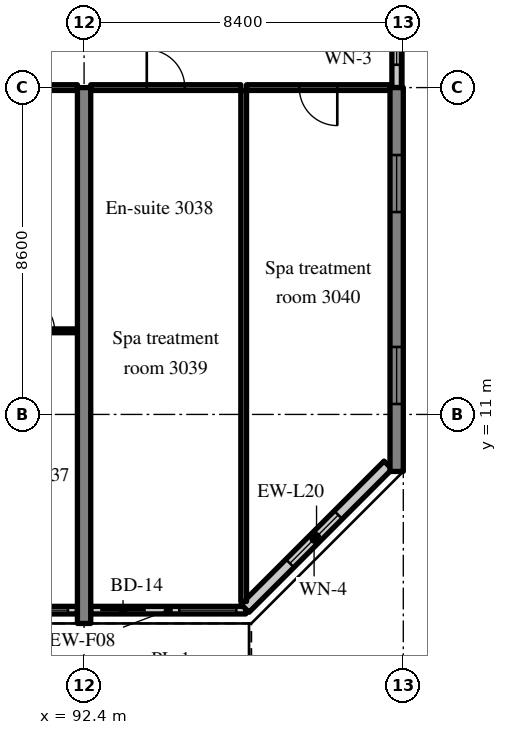
"""IFC4 building model, lengths in metres.
Left out: names, types, materials, properties, quantities, classifications, styles, units other than length and angle.
Written with IfcOpenShell. Run it as: python <this file> out.ifc"""

import sys

from ifc_helpers import new_model, si_unit, direction, frame, frame_2d, origin, place, context, subcontext, project, spatial, rectangle, extrude, source, transform, mapped, element, fill, save


model = new_model("IFC4")
c1 = context("Model", 3, precision=1e-05, world=origin(), true_north=direction((0.0, 1.0)))
c2 = subcontext(c1, "Body", "Model", "MODEL_VIEW")
j1 = project(units=[si_unit("LENGTHUNIT", "METRE"), si_unit("PLANEANGLEUNIT", "RADIAN")], contexts=[c1])
p1 = place(None, origin())
s1 = spatial("IfcSite", under=j1, at=p1, CompositionType="ELEMENT")
p2 = place(p1, origin())
s2 = spatial("IfcBuilding", under=s1, at=p2, CompositionType="ELEMENT")
p3 = place(p2, frame((0.0, 0.0, 125.6)))
s3 = spatial("IfcBuildingStorey", under=s2, at=p3, CompositionType="ELEMENT", Elevation=125.6)
m1 = source(origin(), c2, "Body", "SweptSolid", [
    extrude(rectangle(XDim=14.1, YDim=0.35, at=frame_2d((7.05, 0.0))), origin(), (0.0, 0.0, 1.0), 3.52),
])
p4 = place(p3, frame((92.4, 5.5, 0.0), z_axis=(0.0, 0.0, 1.0), x_axis=(0.0, 1.0, 0.0)))
e1 = element("IfcWall", 1, at=p4, inside=s3, PredefinedType="SHEAR", context=c2, shape_type="MappedRepresentation", body=[
    mapped(m1, transform((0.0, 0.0, 0.0), scale=1.0)),
])
m2 = source(origin(), c2, "Body", "SweptSolid", [
    extrude(rectangle(XDim=10.1, YDim=0.35, at=frame_2d((5.05, 0.0))), origin(), (0.0, 0.0, 1.0), 3.52),
])
p5 = place(p3, frame((100.625, 9.5, 0.0), z_axis=(0.0, 0.0, 1.0), x_axis=(0.0, 1.0, 0.0)))
e2 = element("IfcWall", 2, at=p5, inside=s3, PredefinedType="SHEAR", context=c2, shape_type="MappedRepresentation", body=[
    mapped(m2, transform((0.0, 0.0, 0.0), scale=1.0)),
])
m3 = source(origin(), c2, "Body", "SweptSolid", [
    extrude(rectangle(XDim=1.5, YDim=1.5, at=frame_2d((0.75, 0.75))), frame((0.0, 0.185, 0.0), z_axis=(0.0, -1.0, 0.0), x_axis=(1.0, 0.0, 0.0)), (0.0, 0.0, 1.0), 0.37),
])
p6 = place(p5, frame((1.775, 0.0, 0.9)))
e3 = element("IfcOpeningElement", 3, at=p6, cuts=e2, PredefinedType="OPENING", context=c2, shape_type="MappedRepresentation", body=[
    mapped(m3, transform((0.0, 0.0, 0.0), scale=1.0)),
])
p7 = place(p5, frame((6.825, 0.0, 0.9)))
e4 = element("IfcOpeningElement", 4, at=p7, cuts=e2, PredefinedType="OPENING", context=c2, shape_type="MappedRepresentation", body=[
    mapped(m3, transform((0.0, 0.0, 0.0), scale=1.0)),
])
m4 = source(origin(), c2, "Body", "SweptSolid", [
    extrude(rectangle(XDim=8.05, YDim=0.2, at=frame_2d((4.025, 0.0))), origin(), (0.0, 0.0, 1.0), 2.82),
])
p8 = place(p3, frame((84.175, 5.85, 0.0), z_axis=(0.0, 0.0, 1.0), x_axis=(1.0, 0.0, 0.0)))
e5 = element("IfcWall", 5, at=p8, inside=s3, PredefinedType="SOLIDWALL", context=c2, shape_type="MappedRepresentation", body=[
    mapped(m4, transform((0.0, 0.0, 0.0), scale=1.0)),
])
m5 = source(origin(), c2, "Body", "SweptSolid", [
    extrude(rectangle(XDim=1.2, YDim=2.4, at=frame_2d((0.6, 1.2))), frame((0.0, 0.11, 0.0), z_axis=(0.0, -1.0, 0.0), x_axis=(1.0, 0.0, 0.0)), (0.0, 0.0, 1.0), 0.22),
])
p9 = place(p8, frame((0.25, 0.0, 0.0)))
e6 = element("IfcOpeningElement", 6, at=p9, cuts=e5, PredefinedType="OPENING", context=c2, shape_type="MappedRepresentation", body=[
    mapped(m5, transform((0.0, 0.0, 0.0), scale=1.0)),
])
m6 = source(origin(), c2, "Body", "SweptSolid", [
    extrude(rectangle(XDim=1.5, YDim=1.5, at=frame_2d((0.75, 0.75))), frame((0.0, 0.11, 0.0), z_axis=(0.0, -1.0, 0.0), x_axis=(1.0, 0.0, 0.0)), (0.0, 0.0, 1.0), 0.22),
])
p10 = place(p8, frame((2.275, 0.0, 0.9)))
e7 = element("IfcOpeningElement", 7, at=p10, cuts=e5, PredefinedType="OPENING", context=c2, shape_type="MappedRepresentation", body=[
    mapped(m6, transform((0.0, 0.0, 0.0), scale=1.0)),
])
p11 = place(p8, frame((4.275, 0.0, 0.0)))
e8 = element("IfcOpeningElement", 8, at=p11, cuts=e5, PredefinedType="OPENING", context=c2, shape_type="MappedRepresentation", body=[
    mapped(m5, transform((0.0, 0.0, 0.0), scale=1.0)),
])
p12 = place(p8, frame((6.3, 0.0, 0.9)))
e9 = element("IfcOpeningElement", 9, at=p12, cuts=e5, PredefinedType="OPENING", context=c2, shape_type="MappedRepresentation", body=[
    mapped(m6, transform((0.0, 0.0, 0.0), scale=1.0)),
])
m7 = source(origin(), c2, "Body", "SweptSolid", [
    extrude(rectangle(XDim=4.08, YDim=0.2, at=frame_2d((2.04, 0.0))), origin(), (0.0, 0.0, 1.0), 2.82),
])
p13 = place(p3, frame((92.575, 5.85, 0.0), z_axis=(0.0, 0.0, 1.0), x_axis=(1.0, 0.0, 0.0)))
e10 = element("IfcWall", 10, at=p13, inside=s3, PredefinedType="SOLIDWALL", context=c2, shape_type="MappedRepresentation", body=[
    mapped(m7, transform((0.0, 0.0, 0.0), scale=1.0)),
])
p14 = place(p13, frame((0.25, 0.0, 0.0)))
e11 = element("IfcOpeningElement", 11, at=p14, cuts=e10, PredefinedType="OPENING", context=c2, shape_type="MappedRepresentation", body=[
    mapped(m5, transform((0.0, 0.0, 0.0), scale=1.0)),
])
p15 = place(p13, frame((2.33, 0.0, 0.9)))
e12 = element("IfcOpeningElement", 12, at=p15, cuts=e10, PredefinedType="OPENING", context=c2, shape_type="MappedRepresentation", body=[
    mapped(m6, transform((0.0, 0.0, 0.0), scale=1.0)),
])
m8 = source(origin(), c2, "Body", "SweptSolid", [
    extrude(rectangle(XDim=5.326, YDim=0.3, at=frame_2d((2.663, 0.0))), origin(), (0.0, 0.0, 1.0), 3.52),
])
p16 = place(p3, frame((96.634, 5.9, 0.0), z_axis=(0.0, 0.0, 1.0), x_axis=(0.707083859269, 0.707129702361, 0.0)))
e13 = element("IfcWall", 13, at=p16, inside=s3, PredefinedType="SOLIDWALL", context=c2, shape_type="MappedRepresentation", body=[
    mapped(m8, transform((0.0, 0.0, 0.0), scale=1.0)),
])
m9 = source(origin(), c2, "Body", "SweptSolid", [
    extrude(rectangle(XDim=1.8, YDim=1.5, at=frame_2d((0.9, 0.75))), frame((0.0, 0.16, 0.0), z_axis=(0.0, -1.0, 0.0), x_axis=(1.0, 0.0, 0.0)), (0.0, 0.0, 1.0), 0.32),
])
p17 = place(p16, frame((1.672, 0.0, 0.9)))
e14 = element("IfcOpeningElement", 14, at=p17, cuts=e13, PredefinedType="OPENING", context=c2, shape_type="MappedRepresentation", body=[
    mapped(m9, transform((0.0, 0.0, 0.0), scale=1.0)),
])
m10 = source(origin(), c2, "Body", "SweptSolid", [
    extrude(rectangle(XDim=2.4, YDim=0.25, at=frame_2d((1.2, 0.0))), origin(), (0.0, 0.0, 1.0), 2.62),
])
p18 = place(p3, frame((100.625, 19.6, 0.0), z_axis=(0.0, 0.0, 1.0), x_axis=(0.0, 1.0, 0.0)))
e15 = element("IfcWall", 15, at=p18, inside=s3, PredefinedType="SOLIDWALL", context=c2, shape_type="MappedRepresentation", body=[
    mapped(m10, transform((0.0, 0.0, 0.0), scale=1.0)),
])
m11 = source(origin(), c2, "Body", "SweptSolid", [
    extrude(rectangle(XDim=1.2, YDim=1.5, at=frame_2d((0.6, 0.75))), frame((0.0, 0.135, 0.0), z_axis=(0.0, -1.0, 0.0), x_axis=(1.0, 0.0, 0.0)), (0.0, 0.0, 1.0), 0.27),
])
p19 = place(p18, frame((0.6, 0.0, 0.9)))
e16 = element("IfcOpeningElement", 16, at=p19, cuts=e15, PredefinedType="OPENING", context=c2, shape_type="MappedRepresentation", body=[
    mapped(m11, transform((0.0, 0.0, 0.0), scale=1.0)),
])
m12 = source(origin(), c2, "Body", "SweptSolid", [
    extrude(rectangle(XDim=2.1, YDim=0.1, at=frame_2d((1.05, 0.0))), origin(), (0.0, 0.0, 1.0), 3.52),
])
p20 = place(p3, frame((90.125, 13.2, 0.0), z_axis=(0.0, 0.0, 1.0), x_axis=(1.0, 0.0, 0.0)))
e17 = element("IfcWall", 17, at=p20, inside=s3, PredefinedType="PARTITIONING", context=c2, shape_type="MappedRepresentation", body=[
    mapped(m12, transform((0.0, 0.0, 0.0), scale=1.0)),
])
m13 = source(origin(), c2, "Body", "SweptSolid", [
    extrude(rectangle(XDim=0.9, YDim=2.1, at=frame_2d((0.45, 1.05))), frame((0.0, 0.06, 0.0), z_axis=(0.0, -1.0, 0.0), x_axis=(1.0, 0.0, 0.0)), (0.0, 0.0, 1.0), 0.12),
])
p21 = place(p20, frame((0.6, 0.0, 0.0)))
e18 = element("IfcOpeningElement", 18, at=p21, cuts=e17, PredefinedType="OPENING", context=c2, shape_type="MappedRepresentation", body=[
    mapped(m13, transform((0.0, 0.0, 0.0), scale=1.0)),
])
m14 = source(origin(), c2, "Body", "SweptSolid", [
    extrude(rectangle(XDim=3.95, YDim=0.15, at=frame_2d((1.975, 0.0))), origin(), (0.0, 0.0, 1.0), 2.82),
])
p22 = place(p3, frame((88.275, 19.6, 0.0), z_axis=(0.0, 0.0, 1.0), x_axis=(1.0, 0.0, 0.0)))
e19 = element("IfcWall", 19, at=p22, inside=s3, PredefinedType="PARTITIONING", context=c2, shape_type="MappedRepresentation", body=[
    mapped(m14, transform((0.0, 0.0, 0.0), scale=1.0)),
])
m15 = source(origin(), c2, "Body", "SweptSolid", [
    extrude(rectangle(XDim=1.0, YDim=2.1, at=frame_2d((0.5, 1.05))), frame((0.0, 0.085, 0.0), z_axis=(0.0, -1.0, 0.0), x_axis=(1.0, 0.0, 0.0)), (0.0, 0.0, 1.0), 0.17),
])
p23 = place(p22, frame((0.4, 0.0, 0.0)))
e20 = element("IfcOpeningElement", 20, at=p23, cuts=e19, PredefinedType="OPENING", context=c2, shape_type="MappedRepresentation", body=[
    mapped(m15, transform((0.0, 0.0, 0.0), scale=1.0)),
])
m16 = source(origin(), c2, "Body", "SweptSolid", [
    extrude(rectangle(XDim=3.95, YDim=0.15, at=frame_2d((1.975, 0.0))), origin(), (0.0, 0.0, 1.0), 2.82),
])
p24 = place(p3, frame((92.575, 19.6, 0.0), z_axis=(0.0, 0.0, 1.0), x_axis=(1.0, 0.0, 0.0)))
e21 = element("IfcWall", 21, at=p24, inside=s3, PredefinedType="PARTITIONING", context=c2, shape_type="MappedRepresentation", body=[
    mapped(m16, transform((0.0, 0.0, 0.0), scale=1.0)),
])
p25 = place(p24, frame((1.475, 0.0, 0.0)))
e22 = element("IfcOpeningElement", 22, at=p25, cuts=e21, PredefinedType="OPENING", context=c2, shape_type="MappedRepresentation", body=[
    mapped(m15, transform((0.0, 0.0, 0.0), scale=1.0)),
])
m17 = source(origin(), c2, "Body", "SweptSolid", [
    extrude(rectangle(XDim=3.775, YDim=0.15, at=frame_2d((1.887, 0.0))), origin(), (0.0, 0.0, 1.0), 2.82),
])
p26 = place(p3, frame((96.675, 19.6, 0.0), z_axis=(0.0, 0.0, 1.0), x_axis=(1.0, 0.0, 0.0)))
e23 = element("IfcWall", 23, at=p26, inside=s3, PredefinedType="PARTITIONING", context=c2, shape_type="MappedRepresentation", body=[
    mapped(m17, transform((0.0, 0.0, 0.0), scale=1.0)),
])
p27 = place(p26, frame((1.388, 0.0, 0.0)))
e24 = element("IfcOpeningElement", 24, at=p27, cuts=e23, PredefinedType="OPENING", context=c2, shape_type="MappedRepresentation", body=[
    mapped(m15, transform((0.0, 0.0, 0.0), scale=1.0)),
])
m18 = source(origin(), c2, "Body", "SweptSolid", [
    extrude(rectangle(XDim=13.447, YDim=0.15, at=frame_2d((6.724, 0.0))), origin(), (0.0, 0.0, 1.0), 3.52),
])
p28 = place(p3, frame((96.6, 6.078, 0.0), z_axis=(0.0, 0.0, 1.0), x_axis=(0.0, 1.0, 0.0)))
e25 = element("IfcWall", 25, at=p28, inside=s3, PredefinedType="PARTITIONING", context=c2, shape_type="MappedRepresentation", body=[
    mapped(m18, transform((0.0, 0.0, 0.0), scale=1.0)),
])
m19 = source(origin(), c2, "Body", "SweptSolid", [
    extrude(rectangle(XDim=1.5, YDim=1.5, at=frame_2d((0.75, 0.75))), frame((0.0, 0.03, 0.0), z_axis=(0.0, -1.0, 0.0), x_axis=(1.0, 0.0, 0.0)), (0.0, 0.0, 1.0), 0.06),
])
p29 = place(p12, origin())
e26 = element("IfcWindow", 26, at=p29, inside=s3, PartitioningType="SINGLE_PANEL", PredefinedType="WINDOW", context=c2, shape_type="MappedRepresentation", body=[
    mapped(m19, transform((0.0, 0.0, 0.0), scale=1.0)),
])
fill(e9, e26)
m20 = source(origin(), c2, "Body", "SweptSolid", [
    extrude(rectangle(XDim=1.2, YDim=2.4, at=frame_2d((0.6, 1.2))), frame((0.0, 0.025, 0.0), z_axis=(0.0, -1.0, 0.0), x_axis=(1.0, 0.0, 0.0)), (0.0, 0.0, 1.0), 0.05),
])
p30 = place(p14, origin())
e27 = element("IfcDoor", 27, at=p30, inside=s3, OperationType="SLIDING_TO_RIGHT", PredefinedType="DOOR", context=c2, shape_type="MappedRepresentation", body=[
    mapped(m20, transform((0.0, 0.0, 0.0), scale=1.0)),
])
fill(e11, e27)
p31 = place(p15, origin())
e28 = element("IfcWindow", 28, at=p31, inside=s3, PartitioningType="SINGLE_PANEL", PredefinedType="WINDOW", context=c2, shape_type="MappedRepresentation", body=[
    mapped(m19, transform((0.0, 0.0, 0.0), scale=1.0)),
])
fill(e12, e28)
m21 = source(origin(), c2, "Body", "SweptSolid", [
    extrude(rectangle(XDim=1.8, YDim=1.5, at=frame_2d((0.9, 0.75))), frame((0.0, 0.03, 0.0), z_axis=(0.0, -1.0, 0.0), x_axis=(1.0, 0.0, 0.0)), (0.0, 0.0, 1.0), 0.06),
])
p32 = place(p17, origin())
e29 = element("IfcWindow", 29, at=p32, inside=s3, PartitioningType="SINGLE_PANEL", PredefinedType="WINDOW", context=c2, shape_type="MappedRepresentation", body=[
    mapped(m21, transform((0.0, 0.0, 0.0), scale=1.0)),
])
fill(e14, e29)
p33 = place(p6, origin())
e30 = element("IfcWindow", 30, at=p33, inside=s3, PartitioningType="SINGLE_PANEL", PredefinedType="WINDOW", context=c2, shape_type="MappedRepresentation", body=[
    mapped(m19, transform((0.0, 0.0, 0.0), scale=1.0)),
])
fill(e3, e30)
p34 = place(p7, origin())
e31 = element("IfcWindow", 31, at=p34, inside=s3, PartitioningType="SINGLE_PANEL", PredefinedType="WINDOW", context=c2, shape_type="MappedRepresentation", body=[
    mapped(m19, transform((0.0, 0.0, 0.0), scale=1.0)),
])
fill(e4, e31)
m22 = source(origin(), c2, "Body", "SweptSolid", [
    extrude(rectangle(XDim=1.2, YDim=1.5, at=frame_2d((0.6, 0.75))), frame((0.0, 0.03, 0.0), z_axis=(0.0, -1.0, 0.0), x_axis=(1.0, 0.0, 0.0)), (0.0, 0.0, 1.0), 0.06),
])
p35 = place(p19, origin())
e32 = element("IfcWindow", 32, at=p35, inside=s3, PartitioningType="SINGLE_PANEL", PredefinedType="WINDOW", context=c2, shape_type="MappedRepresentation", body=[
    mapped(m22, transform((0.0, 0.0, 0.0), scale=1.0)),
])
fill(e16, e32)
m23 = source(origin(), c2, "Body", "SweptSolid", [
    extrude(rectangle(XDim=0.9, YDim=2.1, at=frame_2d((0.45, 1.05))), frame((0.0, 0.025, 0.0), z_axis=(0.0, -1.0, 0.0), x_axis=(1.0, 0.0, 0.0)), (0.0, 0.0, 1.0), 0.05),
])
p36 = place(p21, origin())
e33 = element("IfcDoor", 33, at=p36, inside=s3, OperationType="SINGLE_SWING_LEFT", PredefinedType="DOOR", context=c2, shape_type="MappedRepresentation", body=[
    mapped(m23, transform((0.0, 0.0, 0.0), scale=1.0)),
])
fill(e18, e33)
m24 = source(origin(), c2, "Body", "SweptSolid", [
    extrude(rectangle(XDim=1.0, YDim=2.1, at=frame_2d((0.5, 1.05))), frame((0.0, 0.025, 0.0), z_axis=(0.0, -1.0, 0.0), x_axis=(1.0, 0.0, 0.0)), (0.0, 0.0, 1.0), 0.05),
])
p37 = place(p25, origin())
e34 = element("IfcDoor", 34, at=p37, inside=s3, OperationType="SINGLE_SWING_LEFT", PredefinedType="DOOR", context=c2, shape_type="MappedRepresentation", body=[
    mapped(m24, transform((0.0, 0.0, 0.0), scale=1.0)),
])
fill(e22, e34)
p38 = place(p27, origin())
e35 = element("IfcDoor", 35, at=p38, inside=s3, OperationType="SINGLE_SWING_RIGHT", PredefinedType="DOOR", context=c2, shape_type="MappedRepresentation", body=[
    mapped(m24, transform((0.0, 0.0, 0.0), scale=1.0)),
])
fill(e24, e35)
save(model, sys.argv[1])
